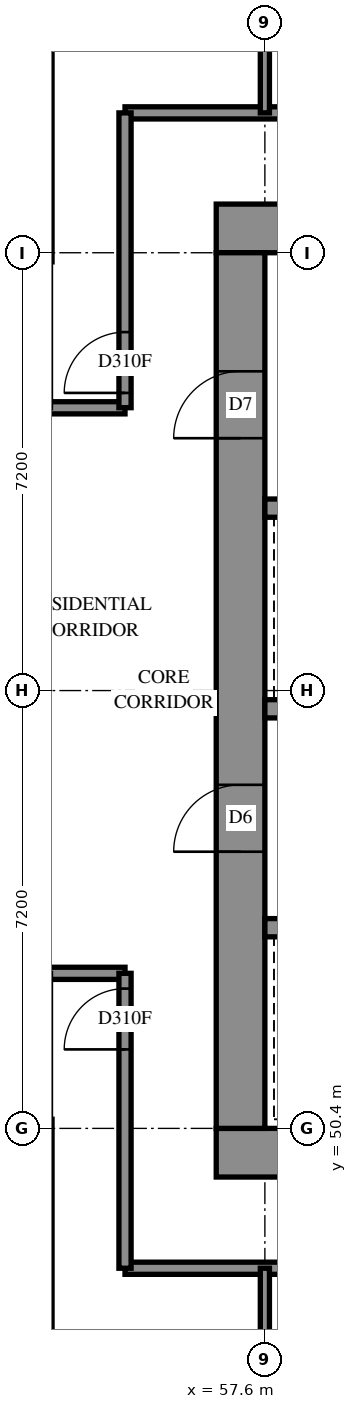
"""IFC4 building model, lengths in metres.
Left out: names, types, materials, properties, quantities, classifications, styles, units other than length and angle.
Written with IfcOpenShell. Run it as: python <this file> out.ifc"""

import sys

from ifc_helpers import new_model, si_unit, direction, frame, frame_2d, origin, place, context, subcontext, project, spatial, rectangle, extrude, element, fill, save


model = new_model("IFC4")
c1 = context("Model", 3, precision=1e-05, world=origin(), true_north=direction((0.0, 1.0)))
c2 = subcontext(c1, "Body", "Model", "MODEL_VIEW")
j1 = project(units=[si_unit("LENGTHUNIT", "METRE"), si_unit("PLANEANGLEUNIT", "RADIAN")], contexts=[c1])
p1 = place(None, origin())
s1 = spatial("IfcSite", under=j1, at=p1, CompositionType="ELEMENT")
p2 = place(p1, origin())
s2 = spatial("IfcBuilding", under=s1, at=p2, CompositionType="ELEMENT")
p3 = place(p2, frame((0.0, 0.0, 81.2)))
s3 = spatial("IfcBuildingStorey", under=s2, at=p3, CompositionType="ELEMENT", Elevation=81.2)
p4 = place(p3, frame((56.8, 50.0, -0.3), z_axis=(0.0, 0.0, 1.0), x_axis=(1.0, 0.0, 0.0)))
e1 = element("IfcWall", 1, at=p4, inside=s3, PredefinedType="SHEAR", context=c2, shape_type="SweptSolid", body=[
    extrude(rectangle(XDim=16.0, YDim=0.8, at=frame_2d((8.0, 0.0))), origin(), (0.0, 0.0, 1.0), 2.7),
])
p5 = place(p3, frame((56.8, 65.2, -0.3), z_axis=(0.0, 0.0, 1.0), x_axis=(1.0, 0.0, 0.0)))
e2 = element("IfcWall", 2, at=p5, inside=s3, PredefinedType="SHEAR", context=c2, shape_type="SweptSolid", body=[
    extrude(rectangle(XDim=16.0, YDim=0.8, at=frame_2d((8.0, 0.0))), origin(), (0.0, 0.0, 1.0), 2.7),
])
p6 = place(p5, frame((10.8, 0.0, 0.3)))
e3 = element("IfcOpeningElement", 3, at=p6, cuts=e2, PredefinedType="OPENING", context=c2, shape_type="SweptSolid", body=[
    extrude(rectangle(XDim=0.8, YDim=2.1, at=frame_2d((0.4, 1.05))), frame((0.0, 0.41, 0.0), z_axis=(0.0, -1.0, 0.0), x_axis=(1.0, 0.0, 0.0)), (0.0, 0.0, 1.0), 0.82),
])
p7 = place(p3, frame((57.2, 50.4, -0.3), z_axis=(0.0, 0.0, 1.0), x_axis=(0.0, 1.0, 0.0)))
e4 = element("IfcWall", 4, at=p7, inside=s3, PredefinedType="SHEAR", context=c2, shape_type="SweptSolid", body=[
    extrude(rectangle(XDim=14.4, YDim=0.8, at=frame_2d((7.2, 0.0))), origin(), (0.0, 0.0, 1.0), 2.7),
])
p8 = place(p7, frame((4.55, 0.0, 0.3)))
e5 = element("IfcOpeningElement", 5, at=p8, cuts=e4, PredefinedType="OPENING", context=c2, shape_type="SweptSolid", body=[
    extrude(rectangle(XDim=1.1, YDim=2.1, at=frame_2d((0.55, 1.05))), frame((0.0, 0.41, 0.0), z_axis=(0.0, -1.0, 0.0), x_axis=(1.0, 0.0, 0.0)), (0.0, 0.0, 1.0), 0.82),
])
p9 = place(p7, frame((11.35, 0.0, 0.3)))
e6 = element("IfcOpeningElement", 6, at=p9, cuts=e4, PredefinedType="OPENING", context=c2, shape_type="SweptSolid", body=[
    extrude(rectangle(XDim=1.1, YDim=2.1, at=frame_2d((0.55, 1.05))), frame((0.0, 0.41, 0.0), z_axis=(0.0, -1.0, 0.0), x_axis=(1.0, 0.0, 0.0)), (0.0, 0.0, 1.0), 0.82),
])
p10 = place(p3, frame((57.6, 53.7, 0.0), z_axis=(0.0, 0.0, 1.0), x_axis=(1.0, 0.0, 0.0)))
e7 = element("IfcWall", 7, at=p10, inside=s3, PredefinedType="SOLIDWALL", context=c2, shape_type="SweptSolid", body=[
    extrude(rectangle(XDim=14.4, YDim=0.3, at=frame_2d((7.2, 0.0))), origin(), (0.0, 0.0, 1.0), 3.1),
])
p11 = place(p10, frame((1.25, 0.0, 0.0)))
e8 = element("IfcOpeningElement", 8, at=p11, cuts=e7, PredefinedType="OPENING", context=c2, shape_type="SweptSolid", body=[
    extrude(rectangle(XDim=1.1, YDim=2.1, at=frame_2d((0.55, 1.05))), frame((0.0, 0.16, 0.0), z_axis=(0.0, -1.0, 0.0), x_axis=(1.0, 0.0, 0.0)), (0.0, 0.0, 1.0), 0.32),
])
p12 = place(p10, frame((4.85, 0.0, 0.0)))
e9 = element("IfcOpeningElement", 9, at=p12, cuts=e7, PredefinedType="OPENING", context=c2, shape_type="SweptSolid", body=[
    extrude(rectangle(XDim=1.1, YDim=2.1, at=frame_2d((0.55, 1.05))), frame((0.0, 0.16, 0.0), z_axis=(0.0, -1.0, 0.0), x_axis=(1.0, 0.0, 0.0)), (0.0, 0.0, 1.0), 0.32),
])
p13 = place(p10, frame((8.45, 0.0, 0.0)))
e10 = element("IfcOpeningElement", 10, at=p13, cuts=e7, PredefinedType="OPENING", context=c2, shape_type="SweptSolid", body=[
    extrude(rectangle(XDim=1.1, YDim=2.1, at=frame_2d((0.55, 1.05))), frame((0.0, 0.16, 0.0), z_axis=(0.0, -1.0, 0.0), x_axis=(1.0, 0.0, 0.0)), (0.0, 0.0, 1.0), 0.32),
])
p14 = place(p10, frame((12.05, 0.0, 0.0)))
e11 = element("IfcOpeningElement", 11, at=p14, cuts=e7, PredefinedType="OPENING", context=c2, shape_type="SweptSolid", body=[
    extrude(rectangle(XDim=1.1, YDim=2.1, at=frame_2d((0.55, 1.05))), frame((0.0, 0.16, 0.0), z_axis=(0.0, -1.0, 0.0), x_axis=(1.0, 0.0, 0.0)), (0.0, 0.0, 1.0), 0.32),
])
p15 = place(p3, frame((57.6, 57.3, 0.0), z_axis=(0.0, 0.0, 1.0), x_axis=(1.0, 0.0, 0.0)))
e12 = element("IfcWall", 12, at=p15, inside=s3, PredefinedType="SOLIDWALL", context=c2, shape_type="SweptSolid", body=[
    extrude(rectangle(XDim=14.4, YDim=0.3, at=frame_2d((7.2, 0.0))), origin(), (0.0, 0.0, 1.0), 3.1),
])
p16 = place(p15, frame((12.05, 0.0, 0.0)))
e13 = element("IfcOpeningElement", 13, at=p16, cuts=e12, PredefinedType="OPENING", context=c2, shape_type="SweptSolid", body=[
    extrude(rectangle(XDim=1.1, YDim=2.1, at=frame_2d((0.55, 1.05))), frame((0.0, 0.16, 0.0), z_axis=(0.0, -1.0, 0.0), x_axis=(1.0, 0.0, 0.0)), (0.0, 0.0, 1.0), 0.32),
])
p17 = place(p3, frame((57.6, 60.6, 0.0), z_axis=(0.0, 0.0, 1.0), x_axis=(1.0, 0.0, 0.0)))
e14 = element("IfcWall", 14, at=p17, inside=s3, PredefinedType="SOLIDWALL", context=c2, shape_type="SweptSolid", body=[
    extrude(rectangle(XDim=7.2, YDim=0.3, at=frame_2d((3.6, 0.0))), origin(), (0.0, 0.0, 1.0), 3.1),
])
p18 = place(p3, frame((33.45, 62.25, 0.0), z_axis=(0.0, 0.0, 1.0), x_axis=(1.0, 0.0, 0.0)))
e15 = element("IfcWall", 15, at=p18, inside=s3, PredefinedType="PARTITIONING", context=c2, shape_type="SweptSolid", body=[
    extrude(rectangle(XDim=21.85, YDim=0.2, at=frame_2d((10.925, 0.0))), origin(), (0.0, 0.0, 1.0), 3.1),
])
p19 = place(p18, frame((0.144, 0.0, 0.0)))
e16 = element("IfcOpeningElement", 16, at=p19, cuts=e15, PredefinedType="OPENING", context=c2, shape_type="SweptSolid", body=[
    extrude(rectangle(XDim=1.0, YDim=2.1, at=frame_2d((0.5, 1.05))), frame((0.0, 0.11, 0.0), z_axis=(0.0, -1.0, 0.0), x_axis=(1.0, 0.0, 0.0)), (0.0, 0.0, 1.0), 0.22),
])
p20 = place(p18, frame((2.95, 0.0, 0.0)))
e17 = element("IfcOpeningElement", 17, at=p20, cuts=e15, PredefinedType="OPENING", context=c2, shape_type="SweptSolid", body=[
    extrude(rectangle(XDim=0.9, YDim=2.1, at=frame_2d((0.45, 1.05))), frame((0.0, 0.11, 0.0), z_axis=(0.0, -1.0, 0.0), x_axis=(1.0, 0.0, 0.0)), (0.0, 0.0, 1.0), 0.22),
])
p21 = place(p18, frame((8.407, 0.0, 0.0)))
e18 = element("IfcOpeningElement", 18, at=p21, cuts=e15, PredefinedType="OPENING", context=c2, shape_type="SweptSolid", body=[
    extrude(rectangle(XDim=0.9, YDim=2.1, at=frame_2d((0.45, 1.05))), frame((0.0, 0.11, 0.0), z_axis=(0.0, -1.0, 0.0), x_axis=(1.0, 0.0, 0.0)), (0.0, 0.0, 1.0), 0.22),
])
p22 = place(p18, frame((15.7, 0.0, 0.0)))
e19 = element("IfcOpeningElement", 19, at=p22, cuts=e15, PredefinedType="OPENING", context=c2, shape_type="SweptSolid", body=[
    extrude(rectangle(XDim=0.9, YDim=2.1, at=frame_2d((0.45, 1.05))), frame((0.0, 0.11, 0.0), z_axis=(0.0, -1.0, 0.0), x_axis=(1.0, 0.0, 0.0)), (0.0, 0.0, 1.0), 0.22),
])
p23 = place(p18, frame((17.35, 0.0, 0.0)))
e20 = element("IfcOpeningElement", 20, at=p23, cuts=e15, PredefinedType="OPENING", context=c2, shape_type="SweptSolid", body=[
    extrude(rectangle(XDim=0.9, YDim=2.1, at=frame_2d((0.45, 1.05))), frame((0.0, 0.11, 0.0), z_axis=(0.0, -1.0, 0.0), x_axis=(1.0, 0.0, 0.0)), (0.0, 0.0, 1.0), 0.22),
])
p24 = place(p3, frame((55.3, 48.1, 0.0), z_axis=(0.0, 0.0, 1.0), x_axis=(1.0, 0.0, 0.0)))
e21 = element("IfcWall", 21, at=p24, inside=s3, PredefinedType="PARTITIONING", context=c2, shape_type="SweptSolid", body=[
    extrude(rectangle(XDim=19.092, YDim=0.2, at=frame_2d((9.546, 0.0))), origin(), (0.0, 0.0, 1.0), 3.1),
])
p25 = place(p24, frame((6.199, 0.0, 0.0)))
e22 = element("IfcOpeningElement", 22, at=p25, cuts=e21, PredefinedType="OPENING", context=c2, shape_type="SweptSolid", body=[
    extrude(rectangle(XDim=0.9, YDim=2.1, at=frame_2d((0.45, 1.05))), frame((0.0, 0.11, 0.0), z_axis=(0.0, -1.0, 0.0), x_axis=(1.0, 0.0, 0.0)), (0.0, 0.0, 1.0), 0.22),
])
p26 = place(p24, frame((13.363, 0.0, 0.0)))
e23 = element("IfcOpeningElement", 23, at=p26, cuts=e21, PredefinedType="OPENING", context=c2, shape_type="SweptSolid", body=[
    extrude(rectangle(XDim=1.0, YDim=2.1, at=frame_2d((0.5, 1.05))), frame((0.0, 0.11, 0.0), z_axis=(0.0, -1.0, 0.0), x_axis=(1.0, 0.0, 0.0)), (0.0, 0.0, 1.0), 0.22),
])
p27 = place(p3, frame((55.3, 67.1, 0.0), z_axis=(0.0, 0.0, 1.0), x_axis=(1.0, 0.0, 0.0)))
e24 = element("IfcWall", 24, at=p27, inside=s3, PredefinedType="PARTITIONING", context=c2, shape_type="SweptSolid", body=[
    extrude(rectangle(XDim=19.0, YDim=0.2, at=frame_2d((9.5, 0.0))), origin(), (0.0, 0.0, 1.0), 3.1),
])
p28 = place(p27, frame((6.161, 0.0, 0.0)))
e25 = element("IfcOpeningElement", 25, at=p28, cuts=e24, PredefinedType="OPENING", context=c2, shape_type="SweptSolid", body=[
    extrude(rectangle(XDim=0.9, YDim=2.1, at=frame_2d((0.45, 1.05))), frame((0.0, 0.11, 0.0), z_axis=(0.0, -1.0, 0.0), x_axis=(1.0, 0.0, 0.0)), (0.0, 0.0, 1.0), 0.22),
])
p29 = place(p27, frame((13.386, 0.0, 0.0)))
e26 = element("IfcOpeningElement", 26, at=p29, cuts=e24, PredefinedType="OPENING", context=c2, shape_type="SweptSolid", body=[
    extrude(rectangle(XDim=1.0, YDim=2.1, at=frame_2d((0.5, 1.05))), frame((0.0, 0.11, 0.0), z_axis=(0.0, -1.0, 0.0), x_axis=(1.0, 0.0, 0.0)), (0.0, 0.0, 1.0), 0.22),
])
p30 = place(p3, frame((50.4, 52.95, 0.0), z_axis=(0.0, 0.0, 1.0), x_axis=(1.0, 0.0, 0.0)))
e27 = element("IfcWall", 27, at=p30, inside=s3, PredefinedType="PARTITIONING", context=c2, shape_type="SweptSolid", body=[
    extrude(rectangle(XDim=4.9, YDim=0.2, at=frame_2d((2.45, 0.0))), origin(), (0.0, 0.0, 1.0), 3.1),
])
p31 = place(p30, frame((0.4, 0.0, 0.0)))
e28 = element("IfcOpeningElement", 28, at=p31, cuts=e27, PredefinedType="OPENING", context=c2, shape_type="SweptSolid", body=[
    extrude(rectangle(XDim=0.9, YDim=2.1, at=frame_2d((0.45, 1.05))), frame((0.0, 0.11, 0.0), z_axis=(0.0, -1.0, 0.0), x_axis=(1.0, 0.0, 0.0)), (0.0, 0.0, 1.0), 0.22),
])
p32 = place(p3, frame((55.3, 48.1, 0.0), z_axis=(0.0, 0.0, 1.0), x_axis=(0.0, 1.0, 0.0)))
e29 = element("IfcWall", 29, at=p32, inside=s3, PredefinedType="PARTITIONING", context=c2, shape_type="SweptSolid", body=[
    extrude(rectangle(XDim=4.85, YDim=0.2, at=frame_2d((2.425, 0.0))), origin(), (0.0, 0.0, 1.0), 3.1),
])
p33 = place(p32, frame((3.599, 0.0, 0.0)))
e30 = element("IfcOpeningElement", 30, at=p33, cuts=e29, PredefinedType="OPENING", context=c2, shape_type="SweptSolid", body=[
    extrude(rectangle(XDim=1.0, YDim=2.1, at=frame_2d((0.5, 1.05))), frame((0.0, 0.11, 0.0), z_axis=(0.0, -1.0, 0.0), x_axis=(1.0, 0.0, 0.0)), (0.0, 0.0, 1.0), 0.22),
])
p34 = place(p3, frame((55.3, 62.252, 0.0), z_axis=(0.0, 0.0, 1.0), x_axis=(0.0, 1.0, 0.0)))
e31 = element("IfcWall", 31, at=p34, inside=s3, PredefinedType="PARTITIONING", context=c2, shape_type="SweptSolid", body=[
    extrude(rectangle(XDim=4.848, YDim=0.2, at=frame_2d((2.424, 0.0))), origin(), (0.0, 0.0, 1.0), 3.1),
])
p35 = place(p34, frame((0.243, 0.0, 0.0)))
e32 = element("IfcOpeningElement", 32, at=p35, cuts=e31, PredefinedType="OPENING", context=c2, shape_type="SweptSolid", body=[
    extrude(rectangle(XDim=1.0, YDim=2.1, at=frame_2d((0.5, 1.05))), frame((0.0, 0.11, 0.0), z_axis=(0.0, -1.0, 0.0), x_axis=(1.0, 0.0, 0.0)), (0.0, 0.0, 1.0), 0.22),
])
for number, where, z_axis, x_axis in (
    (33, (57.6, 67.1, 0.0), (0.0, 0.0, 1.0), (0.0, 1.0, 0.0)),
    (34, (57.6, 45.7, 0.0), (0.0, 0.0, 1.0), (0.0, 1.0, 0.0)),
):
    element("IfcWall", number, at=place(p3, frame(where, z_axis=z_axis, x_axis=x_axis)), inside=s3, PredefinedType="PARTITIONING", context=c2, shape_type="SweptSolid", body=[
        extrude(rectangle(XDim=2.4, YDim=0.15, at=frame_2d((1.2, 0.0))), origin(), (0.0, 0.0, 1.0), 3.1),
    ])
p36 = place(p8, origin())
e35 = element("IfcDoor", 35, at=p36, inside=s3, OperationType="DOUBLE_DOOR_SINGLE_SWING", PredefinedType="DOOR", context=c2, shape_type="SweptSolid", body=[
    extrude(rectangle(XDim=1.1, YDim=2.1, at=frame_2d((0.55, 1.05))), frame((0.0, 0.025, 0.0), z_axis=(0.0, -1.0, 0.0), x_axis=(1.0, 0.0, 0.0)), (0.0, 0.0, 1.0), 0.05),
])
fill(e5, e35)
p37 = place(p9, origin())
e36 = element("IfcDoor", 36, at=p37, inside=s3, OperationType="SINGLE_SWING_LEFT", PredefinedType="DOOR", context=c2, shape_type="SweptSolid", body=[
    extrude(rectangle(XDim=1.1, YDim=2.1, at=frame_2d((0.55, 1.05))), frame((0.0, 0.025, 0.0), z_axis=(0.0, -1.0, 0.0), x_axis=(1.0, 0.0, 0.0)), (0.0, 0.0, 1.0), 0.05),
])
fill(e6, e36)
p38 = place(p35, origin())
e37 = element("IfcDoor", 37, at=p38, inside=s3, OperationType="SINGLE_SWING_LEFT", PredefinedType="DOOR", context=c2, shape_type="SweptSolid", body=[
    extrude(rectangle(XDim=1.0, YDim=2.1, at=frame_2d((0.5, 1.05))), frame((0.0, 0.025, 0.0), z_axis=(0.0, -1.0, 0.0), x_axis=(1.0, 0.0, 0.0)), (0.0, 0.0, 1.0), 0.05),
])
fill(e32, e37)
p39 = place(p33, origin())
e38 = element("IfcDoor", 38, at=p39, inside=s3, OperationType="SINGLE_SWING_RIGHT", PredefinedType="DOOR", context=c2, shape_type="SweptSolid", body=[
    extrude(rectangle(XDim=1.0, YDim=2.1, at=frame_2d((0.5, 1.05))), frame((0.0, 0.025, 0.0), z_axis=(0.0, -1.0, 0.0), x_axis=(1.0, 0.0, 0.0)), (0.0, 0.0, 1.0), 0.05),
])
fill(e30, e38)
save(model, sys.argv[1])
